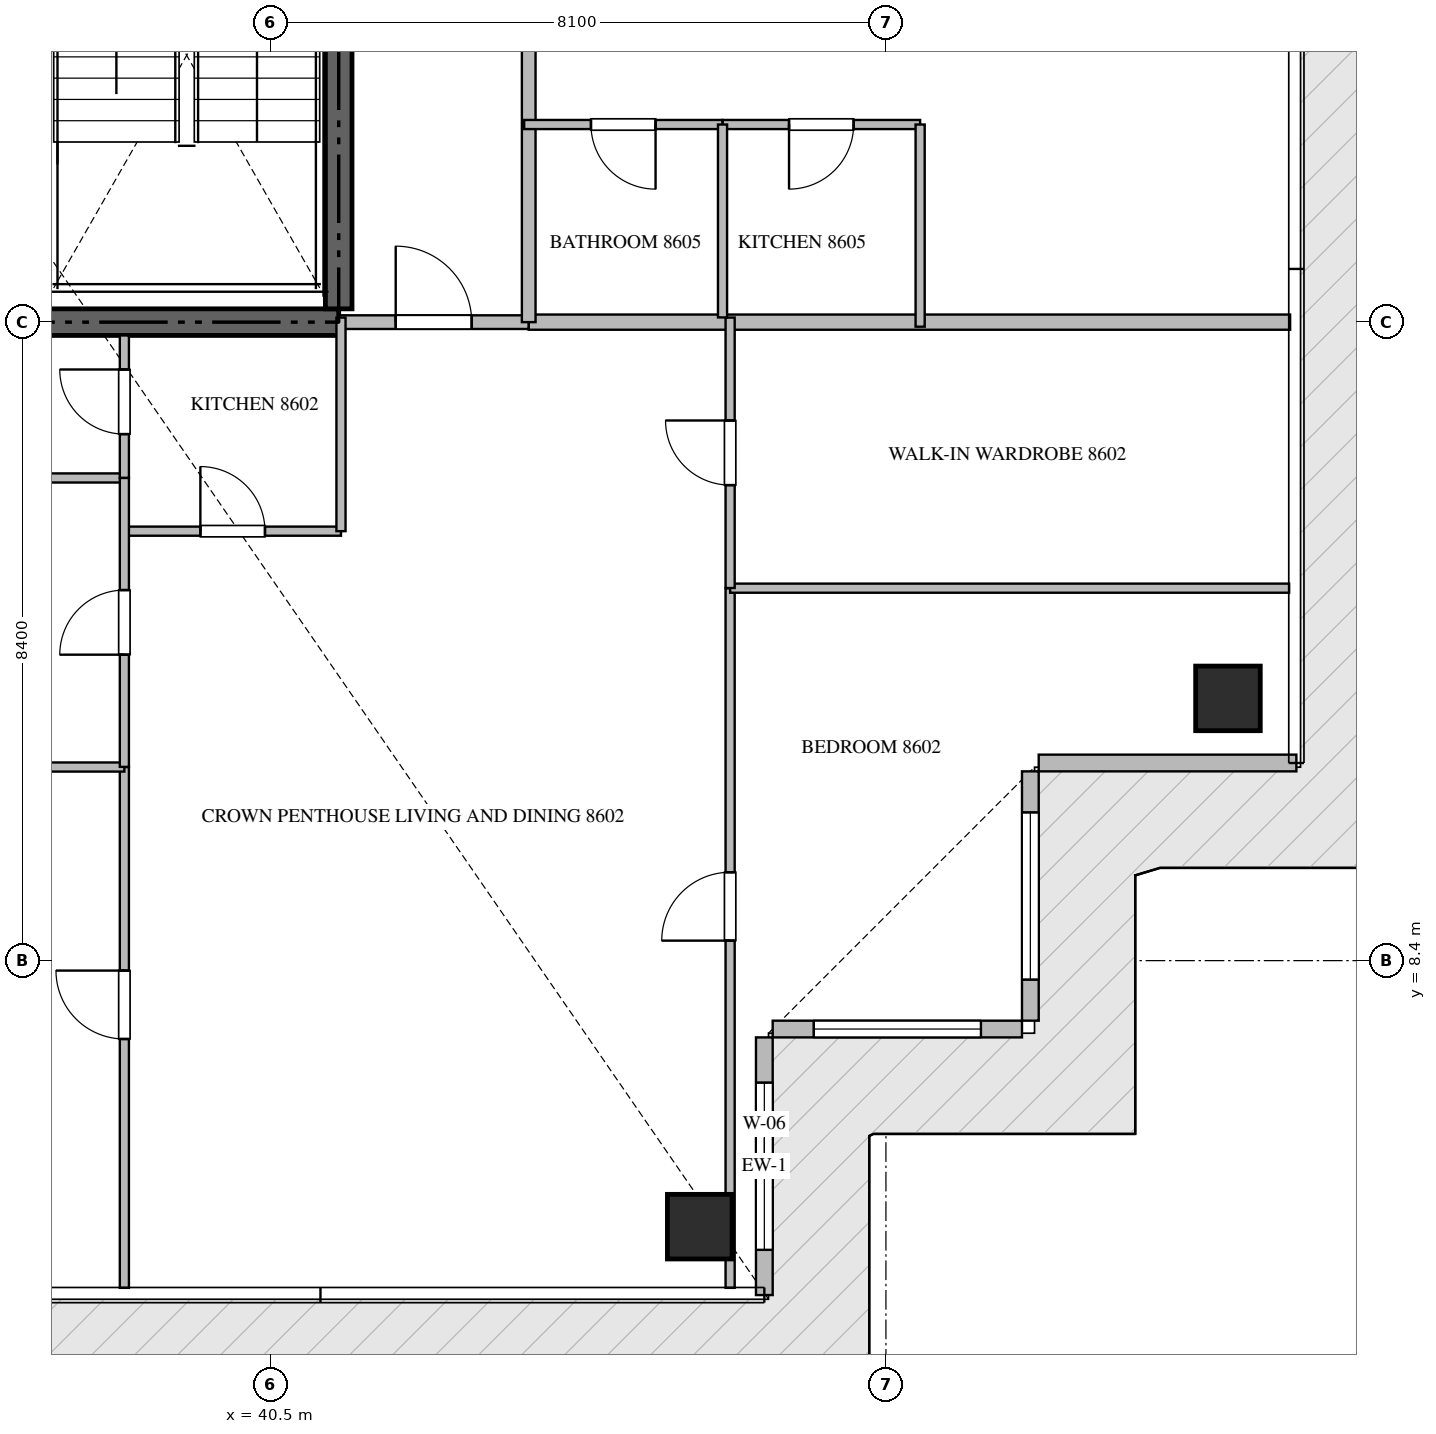
"""IFC4 building model, lengths in metres.
Left out: names, types, materials, properties, quantities, classifications, styles, units other than length and angle.
Written with IfcOpenShell. Run it as: python <this file> out.ifc"""

import sys

from ifc_helpers import new_model, si_unit, direction, frame, frame_2d, origin, origin_2d, place, context, subcontext, project, spatial, rectangle, extrude, source, transform, mapped, element, fill, save


model = new_model("IFC4")
c1 = context("Model", 3, precision=1e-05, world=origin(), true_north=direction((0.0, 1.0)))
c2 = subcontext(c1, "Body", "Model", "MODEL_VIEW")
j1 = project(units=[si_unit("LENGTHUNIT", "METRE"), si_unit("PLANEANGLEUNIT", "RADIAN")], contexts=[c1])
p1 = place(None, origin())
s1 = spatial("IfcSite", under=j1, at=p1, CompositionType="ELEMENT")
p2 = place(p1, origin())
s2 = spatial("IfcBuilding", under=s1, at=p2, CompositionType="ELEMENT")
p3 = place(p2, frame((0.0, 0.0, 347.95)))
s3 = spatial("IfcBuildingStorey", under=s2, at=p3, CompositionType="ELEMENT", Elevation=347.95)
p4 = place(p3, frame((23.4, 16.8, -0.26), z_axis=(0.0, 0.0, 1.0), x_axis=(1.0, 0.0, 0.0)))
e1 = element("IfcWall", 1, at=p4, inside=s3, PredefinedType="SHEAR", context=c2, shape_type="SweptSolid", body=[
    extrude(rectangle(XDim=18.0, YDim=0.35, at=frame_2d((9.0, 0.0))), origin(), (0.0, 0.0, 1.0), 5.898),
])
p5 = place(p3, frame((41.4, 16.975, -0.26), z_axis=(0.0, 0.0, 1.0), x_axis=(0.0, 1.0, 0.0)))
e2 = element("IfcWall", 2, at=p5, inside=s3, PredefinedType="SHEAR", context=c2, shape_type="SweptSolid", body=[
    extrude(rectangle(XDim=8.375, YDim=0.35, at=frame_2d((4.188, 0.0))), origin(), (0.0, 0.0, 1.0), 5.898),
])
m1 = source(origin(), c2, "Body", "SweptSolid", [
    extrude(rectangle(XDim=0.85, YDim=0.85, at=origin_2d()), origin(), (0.0, 0.0, 1.0), 5.9),
])
for number, where, z_axis, x_axis in (
    (3, (46.15, 4.9, -0.26), (0.0, 0.0, 1.0), (1.0, 0.0, 0.0)),
    (4, (53.1, 11.85, -0.26), (0.0, 0.0, 1.0), (1.0, 0.0, 0.0)),
):
    element("IfcColumn", number, at=place(p3, frame(where, z_axis=z_axis, x_axis=x_axis)), inside=s3, PredefinedType="COLUMN", context=c2, shape_type="MappedRepresentation", body=[
        mapped(m1, transform((0.0, 0.0, 0.0), scale=1.0)),
    ])
p6 = place(p3, frame((47.0, 4.0, 0.0), z_axis=(0.0, 0.0, 1.0), x_axis=(0.0, 1.0, 0.0)))
e5 = element("IfcWall", 5, at=p6, inside=s3, PredefinedType="ELEMENTEDWALL", context=c2, shape_type="SweptSolid", body=[
    extrude(rectangle(XDim=3.39, YDim=0.22, at=frame_2d((1.695, 0.0))), origin(), (0.0, 0.0, 1.0), 5.625),
])
p7 = place(p6, frame((0.595, 0.0, 0.65)))
e6 = element("IfcOpeningElement", 6, at=p7, cuts=e5, PredefinedType="OPENING", context=c2, shape_type="SweptSolid", body=[
    extrude(rectangle(XDim=2.2, YDim=2.4, at=frame_2d((1.1, 1.2))), frame((0.0, 0.12, 0.0), z_axis=(0.0, -1.0, 0.0), x_axis=(1.0, 0.0, 0.0)), (0.0, 0.0, 1.0), 0.24),
])
p8 = place(p3, frame((47.11, 7.5, 0.0), z_axis=(0.0, 0.0, 1.0), x_axis=(1.0, 0.0, 0.0)))
e7 = element("IfcWall", 7, at=p8, inside=s3, PredefinedType="ELEMENTEDWALL", context=c2, shape_type="SweptSolid", body=[
    extrude(rectangle(XDim=3.28, YDim=0.22, at=frame_2d((1.64, 0.0))), origin(), (0.0, 0.0, 1.0), 5.625),
])
p9 = place(p8, frame((0.54, 0.0, 0.65)))
e8 = element("IfcOpeningElement", 8, at=p9, cuts=e7, PredefinedType="OPENING", context=c2, shape_type="SweptSolid", body=[
    extrude(rectangle(XDim=2.2, YDim=2.4, at=frame_2d((1.1, 1.2))), frame((0.0, 0.12, 0.0), z_axis=(0.0, -1.0, 0.0), x_axis=(1.0, 0.0, 0.0)), (0.0, 0.0, 1.0), 0.24),
])
p10 = place(p3, frame((50.5, 7.61, 0.0), z_axis=(0.0, 0.0, 1.0), x_axis=(0.0, 1.0, 0.0)))
e9 = element("IfcWall", 9, at=p10, inside=s3, PredefinedType="ELEMENTEDWALL", context=c2, shape_type="SweptSolid", body=[
    extrude(rectangle(XDim=3.28, YDim=0.22, at=frame_2d((1.64, 0.0))), origin(), (0.0, 0.0, 1.0), 5.625),
])
p11 = place(p10, frame((0.54, 0.0, 0.65)))
e10 = element("IfcOpeningElement", 10, at=p11, cuts=e9, PredefinedType="OPENING", context=c2, shape_type="SweptSolid", body=[
    extrude(rectangle(XDim=2.2, YDim=2.4, at=frame_2d((1.1, 1.2))), frame((0.0, 0.12, 0.0), z_axis=(0.0, -1.0, 0.0), x_axis=(1.0, 0.0, 0.0)), (0.0, 0.0, 1.0), 0.24),
])
p12 = place(p3, frame((50.61, 11.0, 0.0), z_axis=(0.0, 0.0, 1.0), x_axis=(1.0, 0.0, 0.0)))
e11 = element("IfcWall", 11, at=p12, inside=s3, PredefinedType="ELEMENTEDWALL", context=c2, shape_type="SweptSolid", body=[
    extrude(rectangle(XDim=3.39, YDim=0.22, at=frame_2d((1.695, 0.0))), origin(), (0.0, 0.0, 1.0), 5.625),
])
p13 = place(p3, frame((43.9, 16.8, 0.0), z_axis=(0.0, 0.0, 1.0), x_axis=(1.0, 0.0, 0.0)))
e12 = element("IfcWall", 12, at=p13, inside=s3, PredefinedType="PARTITIONING", context=c2, shape_type="SweptSolid", body=[
    extrude(rectangle(XDim=10.018, YDim=0.2, at=frame_2d((5.009, 0.0))), origin(), (0.0, 0.0, 1.0), 5.64),
])
p14 = place(p3, frame((41.402, 16.8, 0.0), z_axis=(0.0, 0.0, 1.0), x_axis=(1.0, 0.0, 0.0)))
e13 = element("IfcWall", 13, at=p14, inside=s3, PredefinedType="PARTITIONING", context=c2, shape_type="SweptSolid", body=[
    extrude(rectangle(XDim=2.496, YDim=0.18, at=frame_2d((1.248, 0.0))), origin(), (0.0, 0.0, 1.0), 5.64),
])
p15 = place(p14, frame((0.748, 0.0, 0.0)))
e14 = element("IfcOpeningElement", 14, at=p15, cuts=e13, PredefinedType="OPENING", context=c2, shape_type="SweptSolid", body=[
    extrude(rectangle(XDim=1.0, YDim=2.15, at=frame_2d((0.5, 1.075))), frame((0.0, 0.1, 0.0), z_axis=(0.0, -1.0, 0.0), x_axis=(1.0, 0.0, 0.0)), (0.0, 0.0, 1.0), 0.2),
])
p16 = place(p3, frame((43.9, 16.8, 0.0), z_axis=(0.0, 0.0, 1.0), x_axis=(0.0, 1.0, 0.0)))
e15 = element("IfcWall", 15, at=p16, inside=s3, PredefinedType="PARTITIONING", context=c2, shape_type="SweptSolid", body=[
    extrude(rectangle(XDim=16.8, YDim=0.18, at=frame_2d((8.4, 0.0))), origin(), (0.0, 0.0, 1.0), 5.64),
])
p17 = place(p16, frame((4.993, 0.0, 0.0)))
e16 = element("IfcOpeningElement", 16, at=p17, cuts=e15, PredefinedType="OPENING", context=c2, shape_type="SweptSolid", body=[
    extrude(rectangle(XDim=1.0, YDim=2.15, at=frame_2d((0.5, 1.075))), frame((0.0, 0.1, 0.0), z_axis=(0.0, -1.0, 0.0), x_axis=(1.0, 0.0, 0.0)), (0.0, 0.0, 1.0), 0.2),
])
p18 = place(p16, frame((13.351, 0.0, 0.0)))
e17 = element("IfcOpeningElement", 17, at=p18, cuts=e15, PredefinedType="OPENING", context=c2, shape_type="SweptSolid", body=[
    extrude(rectangle(XDim=1.0, YDim=2.15, at=frame_2d((0.5, 1.075))), frame((0.0, 0.1, 0.0), z_axis=(0.0, -1.0, 0.0), x_axis=(1.0, 0.0, 0.0)), (0.0, 0.0, 1.0), 0.2),
])
p19 = place(p3, frame((38.58, 14.05, 0.0), z_axis=(0.0, 0.0, 1.0), x_axis=(1.0, 0.0, 0.0)))
e18 = element("IfcWall", 18, at=p19, inside=s3, PredefinedType="PARTITIONING", context=c2, shape_type="SweptSolid", body=[
    extrude(rectangle(XDim=2.85, YDim=0.12, at=frame_2d((1.425, 0.0))), origin(), (0.0, 0.0, 1.0), 5.64),
])
p20 = place(p19, frame((1.0, 0.0, 0.0)))
e19 = element("IfcOpeningElement", 19, at=p20, cuts=e18, PredefinedType="OPENING", context=c2, shape_type="SweptSolid", body=[
    extrude(rectangle(XDim=0.85, YDim=2.1, at=frame_2d((0.425, 1.05))), frame((0.0, 0.07, 0.0), z_axis=(0.0, -1.0, 0.0), x_axis=(1.0, 0.0, 0.0)), (0.0, 0.0, 1.0), 0.14),
])
p21 = place(p3, frame((41.43, 14.05, 0.0), z_axis=(0.0, 0.0, 1.0), x_axis=(0.0, 1.0, 0.0)))
e20 = element("IfcWall", 20, at=p21, inside=s3, PredefinedType="PARTITIONING", context=c2, shape_type="SweptSolid", body=[
    extrude(rectangle(XDim=2.81, YDim=0.12, at=frame_2d((1.405, 0.0))), origin(), (0.0, 0.0, 1.0), 5.64),
])
p22 = place(p3, frame((38.58, 4.095, 0.0), z_axis=(0.0, 0.0, 1.0), x_axis=(0.0, 1.0, 0.0)))
e21 = element("IfcWall", 21, at=p22, inside=s3, PredefinedType="PARTITIONING", context=c2, shape_type="SweptSolid", body=[
    extrude(rectangle(XDim=6.852, YDim=0.12, at=frame_2d((3.426, 0.0))), origin(), (0.0, 0.0, 1.0), 5.64),
])
p23 = place(p22, frame((3.274, 0.0, 0.0)))
e22 = element("IfcOpeningElement", 22, at=p23, cuts=e21, PredefinedType="OPENING", context=c2, shape_type="SweptSolid", body=[
    extrude(rectangle(XDim=0.9, YDim=2.1, at=frame_2d((0.45, 1.05))), frame((0.0, 0.07, 0.0), z_axis=(0.0, -1.0, 0.0), x_axis=(1.0, 0.0, 0.0)), (0.0, 0.0, 1.0), 0.14),
])
p24 = place(p3, frame((32.34, 10.947, 0.0), z_axis=(0.0, 0.0, 1.0), x_axis=(1.0, 0.0, 0.0)))
e23 = element("IfcWall", 23, at=p24, inside=s3, PredefinedType="PARTITIONING", context=c2, shape_type="SweptSolid", body=[
    extrude(rectangle(XDim=6.24, YDim=0.12, at=frame_2d((3.12, 0.0))), origin(), (0.0, 0.0, 1.0), 5.64),
])
p25 = place(p3, frame((32.462, 14.75, 0.0), z_axis=(0.0, 0.0, 1.0), x_axis=(1.0, 0.0, 0.0)))
e24 = element("IfcWall", 24, at=p25, inside=s3, PredefinedType="PARTITIONING", context=c2, shape_type="SweptSolid", body=[
    extrude(rectangle(XDim=6.118, YDim=0.12, at=frame_2d((3.059, 0.0))), origin(), (0.0, 0.0, 1.0), 5.64),
])
p26 = place(p3, frame((38.58, 10.949, 0.0), z_axis=(0.0, 0.0, 1.0), x_axis=(0.0, 1.0, 0.0)))
e25 = element("IfcWall", 25, at=p26, inside=s3, PredefinedType="PARTITIONING", context=c2, shape_type="SweptSolid", body=[
    extrude(rectangle(XDim=3.801, YDim=0.12, at=frame_2d((1.9, 0.0))), origin(), (0.0, 0.0, 1.0), 5.64),
])
p27 = place(p26, frame((1.476, 0.0, 0.0)))
e26 = element("IfcOpeningElement", 26, at=p27, cuts=e25, PredefinedType="OPENING", context=c2, shape_type="SweptSolid", body=[
    extrude(rectangle(XDim=0.85, YDim=2.1, at=frame_2d((0.425, 1.05))), frame((0.0, 0.07, 0.0), z_axis=(0.0, -1.0, 0.0), x_axis=(1.0, 0.0, 0.0)), (0.0, 0.0, 1.0), 0.14),
])
p28 = place(p3, frame((38.58, 14.752, 0.0), z_axis=(0.0, 0.0, 1.0), x_axis=(0.0, 1.0, 0.0)))
e27 = element("IfcWall", 27, at=p28, inside=s3, PredefinedType="PARTITIONING", context=c2, shape_type="SweptSolid", body=[
    extrude(rectangle(XDim=1.873, YDim=0.12, at=frame_2d((0.937, 0.0))), origin(), (0.0, 0.0, 1.0), 5.64),
])
p29 = place(p28, frame((0.575, 0.0, 0.0)))
e28 = element("IfcOpeningElement", 28, at=p29, cuts=e27, PredefinedType="OPENING", context=c2, shape_type="SweptSolid", body=[
    extrude(rectangle(XDim=0.85, YDim=2.1, at=frame_2d((0.425, 1.05))), frame((0.0, 0.07, 0.0), z_axis=(0.0, -1.0, 0.0), x_axis=(1.0, 0.0, 0.0)), (0.0, 0.0, 1.0), 0.14),
])
p30 = place(p3, frame((46.55, 4.095, 0.0), z_axis=(0.0, 0.0, 1.0), x_axis=(0.0, 1.0, 0.0)))
e29 = element("IfcWall", 29, at=p30, inside=s3, PredefinedType="PARTITIONING", context=c2, shape_type="SweptSolid", body=[
    extrude(rectangle(XDim=9.205, YDim=0.12, at=frame_2d((4.603, 0.0))), origin(), (0.0, 0.0, 1.0), 5.64),
])
p31 = place(p30, frame((4.568, 0.0, 0.0)))
e30 = element("IfcOpeningElement", 30, at=p31, cuts=e29, PredefinedType="OPENING", context=c2, shape_type="SweptSolid", body=[
    extrude(rectangle(XDim=0.9, YDim=2.1, at=frame_2d((0.45, 1.05))), frame((0.0, 0.07, 0.0), z_axis=(0.0, -1.0, 0.0), x_axis=(1.0, 0.0, 0.0)), (0.0, 0.0, 1.0), 0.14),
])
p32 = place(p3, frame((46.55, 13.3, 0.0), z_axis=(0.0, 0.0, 1.0), x_axis=(1.0, 0.0, 0.0)))
e31 = element("IfcWall", 31, at=p32, inside=s3, PredefinedType="PARTITIONING", context=c2, shape_type="SweptSolid", body=[
    extrude(rectangle(XDim=7.355, YDim=0.12, at=frame_2d((3.677, 0.0))), origin(), (0.0, 0.0, 1.0), 5.64),
])
p33 = place(p3, frame((46.55, 13.302, 0.0), z_axis=(0.0, 0.0, 1.0), x_axis=(0.0, 1.0, 0.0)))
e32 = element("IfcWall", 32, at=p33, inside=s3, PredefinedType="PARTITIONING", context=c2, shape_type="SweptSolid", body=[
    extrude(rectangle(XDim=3.558, YDim=0.12, at=frame_2d((1.779, 0.0))), origin(), (0.0, 0.0, 1.0), 5.64),
])
p34 = place(p33, frame((1.354, 0.0, 0.0)))
e33 = element("IfcOpeningElement", 33, at=p34, cuts=e32, PredefinedType="OPENING", context=c2, shape_type="SweptSolid", body=[
    extrude(rectangle(XDim=0.85, YDim=2.1, at=frame_2d((0.425, 1.05))), frame((0.0, 0.07, 0.0), z_axis=(0.0, -1.0, 0.0), x_axis=(1.0, 0.0, 0.0)), (0.0, 0.0, 1.0), 0.14),
])
p35 = place(p3, frame((49.05, 19.4, 0.0), z_axis=(0.0, 0.0, 1.0), x_axis=(-1.0, 0.0, 0.0)))
e34 = element("IfcWall", 34, at=p35, inside=s3, PredefinedType="PARTITIONING", context=c2, shape_type="SweptSolid", body=[
    extrude(rectangle(XDim=2.6, YDim=0.12, at=frame_2d((1.3, 0.0))), origin(), (0.0, 0.0, 1.0), 5.64),
])
p36 = place(p35, frame((0.875, 0.0, 0.0)))
e35 = element("IfcOpeningElement", 35, at=p36, cuts=e34, PredefinedType="OPENING", context=c2, shape_type="SweptSolid", body=[
    extrude(rectangle(XDim=0.85, YDim=2.1, at=frame_2d((0.425, 1.05))), frame((0.0, 0.07, 0.0), z_axis=(0.0, -1.0, 0.0), x_axis=(1.0, 0.0, 0.0)), (0.0, 0.0, 1.0), 0.14),
])
p37 = place(p3, frame((46.448, 19.4, 0.0), z_axis=(0.0, 0.0, 1.0), x_axis=(-1.0, 0.0, 0.0)))
e36 = element("IfcWall", 36, at=p37, inside=s3, PredefinedType="PARTITIONING", context=c2, shape_type="SweptSolid", body=[
    extrude(rectangle(XDim=2.608, YDim=0.12, at=frame_2d((1.304, 0.0))), origin(), (0.0, 0.0, 1.0), 5.64),
])
p38 = place(p37, frame((0.879, 0.0, 0.0)))
e37 = element("IfcOpeningElement", 37, at=p38, cuts=e36, PredefinedType="OPENING", context=c2, shape_type="SweptSolid", body=[
    extrude(rectangle(XDim=0.85, YDim=2.1, at=frame_2d((0.425, 1.05))), frame((0.0, 0.07, 0.0), z_axis=(0.0, -1.0, 0.0), x_axis=(1.0, 0.0, 0.0)), (0.0, 0.0, 1.0), 0.14),
])
p39 = place(p3, frame((46.45, 16.862, 0.0), z_axis=(0.0, 0.0, 1.0), x_axis=(0.0, 1.0, 0.0)))
e38 = element("IfcWall", 38, at=p39, inside=s3, PredefinedType="PARTITIONING", context=c2, shape_type="SweptSolid", body=[
    extrude(rectangle(XDim=2.538, YDim=0.12, at=frame_2d((1.269, 0.0))), origin(), (0.0, 0.0, 1.0), 5.64),
])
p40 = place(p3, frame((49.05, 16.74, 0.0), z_axis=(0.0, 0.0, 1.0), x_axis=(0.0, 1.0, 0.0)))
e39 = element("IfcWall", 39, at=p40, inside=s3, PredefinedType="PARTITIONING", context=c2, shape_type="SweptSolid", body=[
    extrude(rectangle(XDim=2.66, YDim=0.12, at=frame_2d((1.33, 0.0))), origin(), (0.0, 0.0, 1.0), 5.64),
])
m2 = source(origin(), c2, "Body", "SweptSolid", [
    extrude(rectangle(XDim=2.2, YDim=2.4, at=frame_2d((1.1, 1.2))), frame((0.0, 0.03, 0.0), z_axis=(0.0, -1.0, 0.0), x_axis=(1.0, 0.0, 0.0)), (0.0, 0.0, 1.0), 0.06),
])
p41 = place(p7, origin())
e40 = element("IfcWindow", 40, at=p41, inside=s3, PartitioningType="SINGLE_PANEL", PredefinedType="WINDOW", context=c2, shape_type="MappedRepresentation", body=[
    mapped(m2, transform((0.0, 0.0, 0.0), scale=1.0)),
])
fill(e6, e40)
p42 = place(p9, origin())
e41 = element("IfcWindow", 41, at=p42, inside=s3, PartitioningType="SINGLE_PANEL", PredefinedType="WINDOW", context=c2, shape_type="MappedRepresentation", body=[
    mapped(m2, transform((0.0, 0.0, 0.0), scale=1.0)),
])
fill(e8, e41)
p43 = place(p11, origin())
e42 = element("IfcWindow", 42, at=p43, inside=s3, PartitioningType="SINGLE_PANEL", PredefinedType="WINDOW", context=c2, shape_type="MappedRepresentation", body=[
    mapped(m2, transform((0.0, 0.0, 0.0), scale=1.0)),
])
fill(e10, e42)
m3 = source(origin(), c2, "Body", "SweptSolid", [
    extrude(rectangle(XDim=1.0, YDim=2.15, at=frame_2d((0.5, 1.075))), frame((0.0, 0.025, 0.0), z_axis=(0.0, -1.0, 0.0), x_axis=(1.0, 0.0, 0.0)), (0.0, 0.0, 1.0), 0.05),
])
p44 = place(p15, origin())
e43 = element("IfcDoor", 43, at=p44, inside=s3, OperationType="SINGLE_SWING_LEFT", PredefinedType="DOOR", context=c2, shape_type="MappedRepresentation", body=[
    mapped(m3, transform((0.0, 0.0, 0.0), scale=1.0)),
])
fill(e14, e43)
m4 = source(origin(), c2, "Body", "SweptSolid", [
    extrude(rectangle(XDim=0.85, YDim=2.1, at=frame_2d((0.425, 1.05))), frame((0.0, 0.025, 0.0), z_axis=(0.0, -1.0, 0.0), x_axis=(1.0, 0.0, 0.0)), (0.0, 0.0, 1.0), 0.05),
])
p45 = place(p20, origin())
e44 = element("IfcDoor", 44, at=p45, inside=s3, OperationType="SINGLE_SWING_LEFT", PredefinedType="DOOR", context=c2, shape_type="MappedRepresentation", body=[
    mapped(m4, transform((0.0, 0.0, 0.0), scale=1.0)),
])
fill(e19, e44)
m5 = source(origin(), c2, "Body", "SweptSolid", [
    extrude(rectangle(XDim=0.9, YDim=2.1, at=frame_2d((0.45, 1.05))), frame((0.0, 0.025, 0.0), z_axis=(0.0, -1.0, 0.0), x_axis=(1.0, 0.0, 0.0)), (0.0, 0.0, 1.0), 0.05),
])
p46 = place(p23, origin())
e45 = element("IfcDoor", 45, at=p46, inside=s3, OperationType="SINGLE_SWING_RIGHT", PredefinedType="DOOR", context=c2, shape_type="MappedRepresentation", body=[
    mapped(m5, transform((0.0, 0.0, 0.0), scale=1.0)),
])
fill(e22, e45)
p47 = place(p27, origin())
e46 = element("IfcDoor", 46, at=p47, inside=s3, OperationType="SINGLE_SWING_LEFT", PredefinedType="DOOR", context=c2, shape_type="MappedRepresentation", body=[
    mapped(m4, transform((0.0, 0.0, 0.0), scale=1.0)),
])
fill(e26, e46)
p48 = place(p29, origin())
e47 = element("IfcDoor", 47, at=p48, inside=s3, OperationType="SINGLE_SWING_RIGHT", PredefinedType="DOOR", context=c2, shape_type="MappedRepresentation", body=[
    mapped(m4, transform((0.0, 0.0, 0.0), scale=1.0)),
])
fill(e28, e47)
p49 = place(p31, origin())
e48 = element("IfcDoor", 48, at=p49, inside=s3, OperationType="SINGLE_SWING_LEFT", PredefinedType="DOOR", context=c2, shape_type="MappedRepresentation", body=[
    mapped(m5, transform((0.0, 0.0, 0.0), scale=1.0)),
])
fill(e30, e48)
p50 = place(p34, origin())
e49 = element("IfcDoor", 49, at=p50, inside=s3, OperationType="SINGLE_SWING_RIGHT", PredefinedType="DOOR", context=c2, shape_type="MappedRepresentation", body=[
    mapped(m4, transform((0.0, 0.0, 0.0), scale=1.0)),
])
fill(e33, e49)
p51 = place(p36, origin())
e50 = element("IfcDoor", 50, at=p51, inside=s3, OperationType="SINGLE_SWING_RIGHT", PredefinedType="DOOR", context=c2, shape_type="MappedRepresentation", body=[
    mapped(m4, transform((0.0, 0.0, 0.0), scale=1.0)),
])
fill(e35, e50)
p52 = place(p38, origin())
e51 = element("IfcDoor", 51, at=p52, inside=s3, OperationType="SINGLE_SWING_LEFT", PredefinedType="DOOR", context=c2, shape_type="MappedRepresentation", body=[
    mapped(m4, transform((0.0, 0.0, 0.0), scale=1.0)),
])
fill(e37, e51)
save(model, sys.argv[1])
